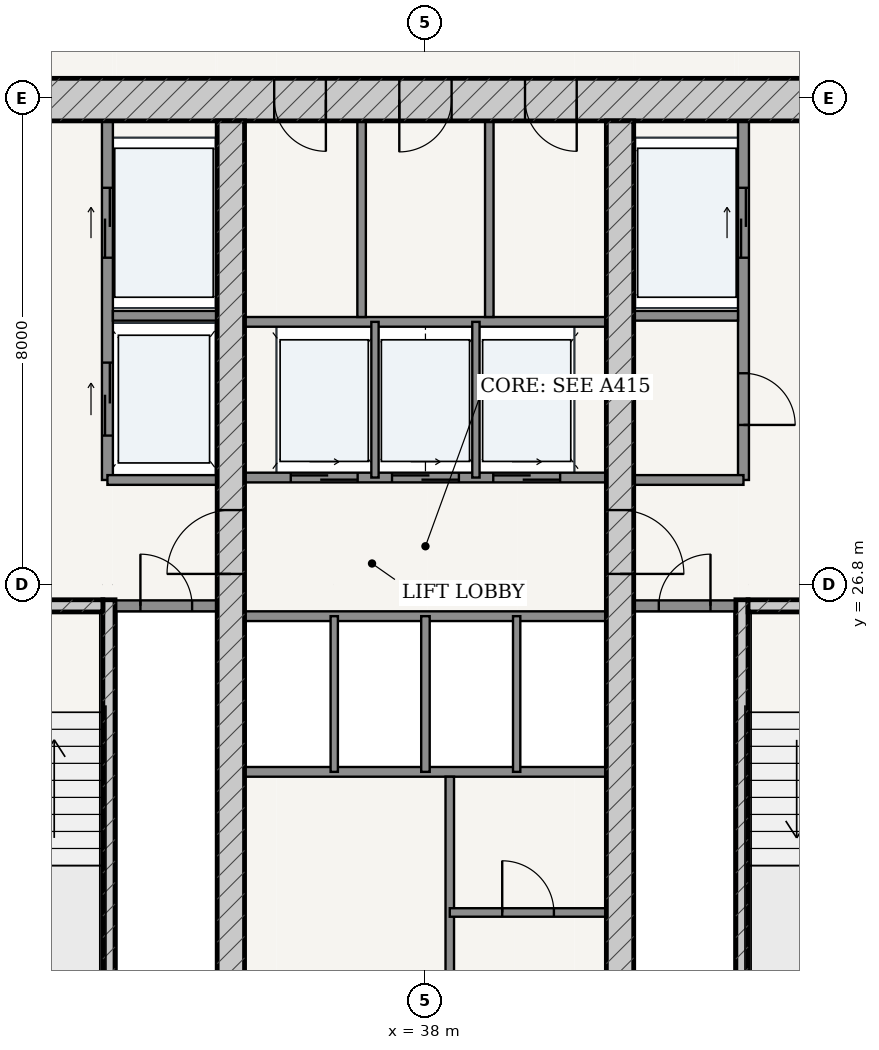
"""IFC4 building model, lengths in metres.
Left out: names, types, materials, properties, quantities, classifications, styles, units other than length and angle.
Written with IfcOpenShell. Run it as: python <this file> out.ifc"""

import sys

from ifc_helpers import new_model, si_unit, direction, frame, frame_2d, origin, place, context, subcontext, project, spatial, rectangle, extrude, source, transform, mapped, element, fill, save


model = new_model("IFC4")
c1 = context("Model", 3, precision=1e-05, world=origin(), true_north=direction((-0.2419218956, 0.970295726276)))
c2 = subcontext(c1, "Body", "Model", "MODEL_VIEW")
j1 = project(units=[si_unit("LENGTHUNIT", "METRE"), si_unit("PLANEANGLEUNIT", "RADIAN")], contexts=[c1])
p1 = place(None, origin())
s1 = spatial("IfcSite", under=j1, at=p1, CompositionType="ELEMENT")
p2 = place(p1, origin())
s2 = spatial("IfcBuilding", under=s1, at=p2, CompositionType="ELEMENT")
p3 = place(p2, frame((0.0, 0.0, 79.8)))
s3 = spatial("IfcBuildingStorey", under=s2, at=p3, CompositionType="ELEMENT", Elevation=79.8)
p4 = place(p3, frame((28.675, 34.775, 0.0), z_axis=(0.0, 0.0, 1.0), x_axis=(1.0, 0.0, 0.0)))
e1 = element("IfcWall", 1, at=p4, inside=s3, PredefinedType="SHEAR", context=c2, shape_type="SweptSolid", body=[
    extrude(rectangle(XDim=18.65, YDim=0.7, at=frame_2d((9.325, 0.0))), origin(), (0.0, 0.0, 1.0), 3.325),
])
p5 = place(p4, frame((6.837, 0.0, 0.0)))
e2 = element("IfcOpeningElement", 2, at=p5, cuts=e1, PredefinedType="OPENING", context=c2, shape_type="SweptSolid", body=[
    extrude(rectangle(XDim=0.85, YDim=2.1, at=frame_2d((0.425, 1.05))), frame((0.0, 0.36, 0.0), z_axis=(0.0, -1.0, 0.0), x_axis=(1.0, 0.0, 0.0)), (0.0, 0.0, 1.0), 0.72),
])
p6 = place(p4, frame((8.895, 0.0, 0.0)))
e3 = element("IfcOpeningElement", 3, at=p6, cuts=e1, PredefinedType="OPENING", context=c2, shape_type="SweptSolid", body=[
    extrude(rectangle(XDim=0.86, YDim=2.1, at=frame_2d((0.43, 1.05))), frame((0.0, 0.36, 0.0), z_axis=(0.0, -1.0, 0.0), x_axis=(1.0, 0.0, 0.0)), (0.0, 0.0, 1.0), 0.72),
])
p7 = place(p4, frame((10.962, 0.0, 0.0)))
e4 = element("IfcOpeningElement", 4, at=p7, cuts=e1, PredefinedType="OPENING", context=c2, shape_type="SweptSolid", body=[
    extrude(rectangle(XDim=0.85, YDim=2.1, at=frame_2d((0.425, 1.05))), frame((0.0, 0.36, 0.0), z_axis=(0.0, -1.0, 0.0), x_axis=(1.0, 0.0, 0.0)), (0.0, 0.0, 1.0), 0.72),
])
p8 = place(p3, frame((32.795, 19.175, 0.0), z_axis=(0.0, 0.0, 1.0), x_axis=(0.0, 1.0, 0.0)))
e5 = element("IfcWall", 5, at=p8, inside=s3, PredefinedType="SOLIDWALL", context=c2, shape_type="SweptSolid", body=[
    extrude(rectangle(XDim=7.375, YDim=0.2, at=frame_2d((3.688, 0.0))), origin(), (0.0, 0.0, 1.0), 3.325),
])
p9 = place(p3, frame((29.375, 26.45, 0.0), z_axis=(0.0, 0.0, 1.0), x_axis=(1.0, 0.0, 0.0)))
e6 = element("IfcWall", 6, at=p9, inside=s3, PredefinedType="SOLIDWALL", context=c2, shape_type="SweptSolid", body=[
    extrude(rectangle(XDim=3.32, YDim=0.2, at=frame_2d((1.66, 0.0))), origin(), (0.0, 0.0, 1.0), 3.325),
])
p10 = place(p9, frame((1.185, 0.0, 0.0)))
e7 = element("IfcOpeningElement", 7, at=p10, cuts=e6, PredefinedType="OPENING", context=c2, shape_type="SweptSolid", body=[
    extrude(rectangle(XDim=0.95, YDim=2.15, at=frame_2d((0.475, 1.075))), frame((0.0, 0.11, 0.0), z_axis=(0.0, -1.0, 0.0), x_axis=(1.0, 0.0, 0.0)), (0.0, 0.0, 1.0), 0.22),
])
p11 = place(p3, frame((43.205, 19.175, 0.0), z_axis=(0.0, 0.0, 1.0), x_axis=(0.0, 1.0, 0.0)))
e8 = element("IfcWall", 8, at=p11, inside=s3, PredefinedType="SOLIDWALL", context=c2, shape_type="SweptSolid", body=[
    extrude(rectangle(XDim=7.375, YDim=0.2, at=frame_2d((3.688, 0.0))), origin(), (0.0, 0.0, 1.0), 3.325),
])
p12 = place(p3, frame((43.305, 26.45, 0.0), z_axis=(0.0, 0.0, 1.0), x_axis=(1.0, 0.0, 0.0)))
e9 = element("IfcWall", 9, at=p12, inside=s3, PredefinedType="SOLIDWALL", context=c2, shape_type="SweptSolid", body=[
    extrude(rectangle(XDim=3.32, YDim=0.2, at=frame_2d((1.66, 0.0))), origin(), (0.0, 0.0, 1.0), 3.325),
])
p13 = place(p12, frame((1.185, 0.0, 0.0)))
e10 = element("IfcOpeningElement", 10, at=p13, cuts=e9, PredefinedType="OPENING", context=c2, shape_type="SweptSolid", body=[
    extrude(rectangle(XDim=0.95, YDim=2.15, at=frame_2d((0.475, 1.075))), frame((0.0, 0.11, 0.0), z_axis=(0.0, -1.0, 0.0), x_axis=(1.0, 0.0, 0.0)), (0.0, 0.0, 1.0), 0.22),
])
p14 = place(p3, frame((34.8, 19.175, 0.0), z_axis=(0.0, 0.0, 1.0), x_axis=(0.0, 1.0, 0.0)))
e11 = element("IfcWall", 11, at=p14, inside=s3, PredefinedType="SHEAR", context=c2, shape_type="SweptSolid", body=[
    extrude(rectangle(XDim=15.25, YDim=0.45, at=frame_2d((7.625, 0.0))), origin(), (0.0, 0.0, 1.0), 3.325),
])
p15 = place(p14, frame((7.8, 0.0, 0.0)))
e12 = element("IfcOpeningElement", 12, at=p15, cuts=e11, PredefinedType="OPENING", context=c2, shape_type="SweptSolid", body=[
    extrude(rectangle(XDim=1.05, YDim=2.15, at=frame_2d((0.525, 1.075))), frame((0.0, 0.235, 0.0), z_axis=(0.0, -1.0, 0.0), x_axis=(1.0, 0.0, 0.0)), (0.0, 0.0, 1.0), 0.47),
])
p16 = place(p3, frame((41.2, 19.175, 0.0), z_axis=(0.0, 0.0, 1.0), x_axis=(0.0, 1.0, 0.0)))
e13 = element("IfcWall", 13, at=p16, inside=s3, PredefinedType="SHEAR", context=c2, shape_type="SweptSolid", body=[
    extrude(rectangle(XDim=15.25, YDim=0.45, at=frame_2d((7.625, 0.0))), origin(), (0.0, 0.0, 1.0), 3.325),
])
p17 = place(p16, frame((7.8, 0.0, 0.0)))
e14 = element("IfcOpeningElement", 14, at=p17, cuts=e13, PredefinedType="OPENING", context=c2, shape_type="SweptSolid", body=[
    extrude(rectangle(XDim=1.05, YDim=2.15, at=frame_2d((0.525, 1.075))), frame((0.0, 0.235, 0.0), z_axis=(0.0, -1.0, 0.0), x_axis=(1.0, 0.0, 0.0)), (0.0, 0.0, 1.0), 0.47),
])
p18 = place(p3, frame((32.9, 26.45, 0.0), z_axis=(0.0, 0.0, 1.0), x_axis=(1.0, 0.0, 0.0)))
e15 = element("IfcWall", 15, at=p18, inside=s3, PredefinedType="PARTITIONING", context=c2, shape_type="SweptSolid", body=[
    extrude(rectangle(XDim=1.675, YDim=0.18, at=frame_2d((0.837, 0.0))), origin(), (0.0, 0.0, 1.0), 3.325),
])
p19 = place(p18, frame((0.413, 0.0, 0.0)))
e16 = element("IfcOpeningElement", 16, at=p19, cuts=e15, PredefinedType="OPENING", context=c2, shape_type="SweptSolid", body=[
    extrude(rectangle(XDim=0.85, YDim=2.1, at=frame_2d((0.425, 1.05))), frame((0.0, 0.1, 0.0), z_axis=(0.0, -1.0, 0.0), x_axis=(1.0, 0.0, 0.0)), (0.0, 0.0, 1.0), 0.2),
])
p20 = place(p3, frame((41.425, 26.45, 0.0), z_axis=(0.0, 0.0, 1.0), x_axis=(1.0, 0.0, 0.0)))
e17 = element("IfcWall", 17, at=p20, inside=s3, PredefinedType="PARTITIONING", context=c2, shape_type="SweptSolid", body=[
    extrude(rectangle(XDim=1.675, YDim=0.18, at=frame_2d((0.837, 0.0))), origin(), (0.0, 0.0, 1.0), 3.325),
])
p21 = place(p20, frame((0.413, 0.0, 0.0)))
e18 = element("IfcOpeningElement", 18, at=p21, cuts=e17, PredefinedType="OPENING", context=c2, shape_type="SweptSolid", body=[
    extrude(rectangle(XDim=0.85, YDim=2.1, at=frame_2d((0.425, 1.05))), frame((0.0, 0.1, 0.0), z_axis=(0.0, -1.0, 0.0), x_axis=(1.0, 0.0, 0.0)), (0.0, 0.0, 1.0), 0.2),
])
p22 = place(p3, frame((32.77, 28.52, 0.0), z_axis=(0.0, 0.0, 1.0), x_axis=(0.0, 1.0, 0.0)))
e19 = element("IfcWall", 19, at=p22, inside=s3, PredefinedType="PARTITIONING", context=c2, shape_type="SweptSolid", body=[
    extrude(rectangle(XDim=5.905, YDim=0.18, at=frame_2d((2.953, 0.0))), origin(), (0.0, 0.0, 1.0), 3.325),
])
p23 = place(p22, frame((3.655, 0.0, 0.0)))
e20 = element("IfcOpeningElement", 20, at=p23, cuts=e19, PredefinedType="OPENING", context=c2, shape_type="SweptSolid", body=[
    extrude(rectangle(XDim=1.15, YDim=2.2, at=frame_2d((0.575, 1.1))), frame((0.0, 0.1, 0.0), z_axis=(0.0, -1.0, 0.0), x_axis=(1.0, 0.0, 0.0)), (0.0, 0.0, 1.0), 0.2),
])
p24 = place(p22, frame((0.73, 0.0, 0.0)))
e21 = element("IfcOpeningElement", 21, at=p24, cuts=e19, PredefinedType="OPENING", context=c2, shape_type="SweptSolid", body=[
    extrude(rectangle(XDim=1.2, YDim=2.25, at=frame_2d((0.6, 1.125))), frame((0.0, 0.1, 0.0), z_axis=(0.0, -1.0, 0.0), x_axis=(1.0, 0.0, 0.0)), (0.0, 0.0, 1.0), 0.2),
])
p25 = place(p3, frame((32.86, 31.22, 0.0), z_axis=(0.0, 0.0, 1.0), x_axis=(1.0, 0.0, 0.0)))
e22 = element("IfcWall", 22, at=p25, inside=s3, PredefinedType="PARTITIONING", context=c2, shape_type="SweptSolid", body=[
    extrude(rectangle(XDim=1.715, YDim=0.16, at=frame_2d((0.857, 0.0))), origin(), (0.0, 0.0, 1.0), 3.325),
])
p26 = place(p3, frame((32.77, 28.52, 0.0), z_axis=(0.0, 0.0, 1.0), x_axis=(1.0, 0.0, 0.0)))
e23 = element("IfcWall", 23, at=p26, inside=s3, PredefinedType="PARTITIONING", context=c2, shape_type="SweptSolid", body=[
    extrude(rectangle(XDim=1.805, YDim=0.16, at=frame_2d((0.902, 0.0))), origin(), (0.0, 0.0, 1.0), 3.325),
])
p27 = place(p3, frame((43.23, 28.52, 0.0), z_axis=(0.0, 0.0, 1.0), x_axis=(0.0, 1.0, 0.0)))
e24 = element("IfcWall", 24, at=p27, inside=s3, PredefinedType="PARTITIONING", context=c2, shape_type="SweptSolid", body=[
    extrude(rectangle(XDim=5.905, YDim=0.18, at=frame_2d((2.953, 0.0))), origin(), (0.0, 0.0, 1.0), 3.325),
])
p28 = place(p27, frame((0.905, 0.0, 0.0)))
e25 = element("IfcOpeningElement", 25, at=p28, cuts=e24, PredefinedType="OPENING", context=c2, shape_type="SweptSolid", body=[
    extrude(rectangle(XDim=0.85, YDim=2.1, at=frame_2d((0.425, 1.05))), frame((0.0, 0.1, 0.0), z_axis=(0.0, -1.0, 0.0), x_axis=(1.0, 0.0, 0.0)), (0.0, 0.0, 1.0), 0.2),
])
p29 = place(p27, frame((3.655, 0.0, 0.0)))
e26 = element("IfcOpeningElement", 26, at=p29, cuts=e24, PredefinedType="OPENING", context=c2, shape_type="SweptSolid", body=[
    extrude(rectangle(XDim=1.15, YDim=2.2, at=frame_2d((0.575, 1.1))), frame((0.0, 0.1, 0.0), z_axis=(0.0, -1.0, 0.0), x_axis=(1.0, 0.0, 0.0)), (0.0, 0.0, 1.0), 0.2),
])
p30 = place(p3, frame((41.425, 31.22, 0.0), z_axis=(0.0, 0.0, 1.0), x_axis=(1.0, 0.0, 0.0)))
e27 = element("IfcWall", 27, at=p30, inside=s3, PredefinedType="PARTITIONING", context=c2, shape_type="SweptSolid", body=[
    extrude(rectangle(XDim=1.715, YDim=0.16, at=frame_2d((0.857, 0.0))), origin(), (0.0, 0.0, 1.0), 3.325),
])
p31 = place(p3, frame((41.425, 28.52, 0.0), z_axis=(0.0, 0.0, 1.0), x_axis=(1.0, 0.0, 0.0)))
e28 = element("IfcWall", 28, at=p31, inside=s3, PredefinedType="PARTITIONING", context=c2, shape_type="SweptSolid", body=[
    extrude(rectangle(XDim=1.805, YDim=0.16, at=frame_2d((0.902, 0.0))), origin(), (0.0, 0.0, 1.0), 3.325),
])
p32 = place(p3, frame((35.025, 28.56, 0.0), z_axis=(0.0, 0.0, 1.0), x_axis=(1.0, 0.0, 0.0)))
e29 = element("IfcWall", 29, at=p32, inside=s3, PredefinedType="PARTITIONING", context=c2, shape_type="SweptSolid", body=[
    extrude(rectangle(XDim=5.95, YDim=0.16, at=frame_2d((2.975, 0.0))), origin(), (0.0, 0.0, 1.0), 3.325),
])
p33 = place(p32, frame((0.76, 0.0, 0.0)))
e30 = element("IfcOpeningElement", 30, at=p33, cuts=e29, PredefinedType="OPENING", context=c2, shape_type="SweptSolid", body=[
    extrude(rectangle(XDim=1.1, YDim=2.2, at=frame_2d((0.55, 1.1))), frame((0.0, 0.09, 0.0), z_axis=(0.0, -1.0, 0.0), x_axis=(1.0, 0.0, 0.0)), (0.0, 0.0, 1.0), 0.18),
])
p34 = place(p32, frame((2.425, 0.0, 0.0)))
e31 = element("IfcOpeningElement", 31, at=p34, cuts=e29, PredefinedType="OPENING", context=c2, shape_type="SweptSolid", body=[
    extrude(rectangle(XDim=1.1, YDim=2.2, at=frame_2d((0.55, 1.1))), frame((0.0, 0.09, 0.0), z_axis=(0.0, -1.0, 0.0), x_axis=(1.0, 0.0, 0.0)), (0.0, 0.0, 1.0), 0.18),
])
p35 = place(p32, frame((4.09, 0.0, 0.0)))
e32 = element("IfcOpeningElement", 32, at=p35, cuts=e29, PredefinedType="OPENING", context=c2, shape_type="SweptSolid", body=[
    extrude(rectangle(XDim=1.1, YDim=2.2, at=frame_2d((0.55, 1.1))), frame((0.0, 0.09, 0.0), z_axis=(0.0, -1.0, 0.0), x_axis=(1.0, 0.0, 0.0)), (0.0, 0.0, 1.0), 0.18),
])
p36 = place(p3, frame((35.025, 31.12, 0.0), z_axis=(0.0, 0.0, 1.0), x_axis=(1.0, 0.0, 0.0)))
e33 = element("IfcWall", 33, at=p36, inside=s3, PredefinedType="PARTITIONING", context=c2, shape_type="SweptSolid", body=[
    extrude(rectangle(XDim=5.95, YDim=0.16, at=frame_2d((2.975, 0.0))), origin(), (0.0, 0.0, 1.0), 3.325),
])
for number, where, z_axis, x_axis in (
    (34, (37.17, 28.56, 0.0), (0.0, 0.0, 1.0), (0.0, 1.0, 0.0)),
    (35, (38.83, 28.56, 0.0), (0.0, 0.0, 1.0), (0.0, 1.0, 0.0)),
):
    element("IfcWall", number, at=place(p3, frame(where, z_axis=z_axis, x_axis=x_axis)), inside=s3, PredefinedType="PARTITIONING", context=c2, shape_type="SweptSolid", body=[
        extrude(rectangle(XDim=2.56, YDim=0.12, at=frame_2d((1.28, 0.0))), origin(), (0.0, 0.0, 1.0), 3.325),
    ])
for number, where, z_axis, x_axis in (
    (36, (36.95, 31.2, 0.0), (0.0, 0.0, 1.0), (0.0, 1.0, 0.0)),
    (37, (39.05, 31.2, 0.0), (0.0, 0.0, 1.0), (0.0, 1.0, 0.0)),
):
    element("IfcWall", number, at=place(p3, frame(where, z_axis=z_axis, x_axis=x_axis)), inside=s3, PredefinedType="PARTITIONING", context=c2, shape_type="SweptSolid", body=[
        extrude(rectangle(XDim=3.225, YDim=0.14, at=frame_2d((1.613, 0.0))), origin(), (0.0, 0.0, 1.0), 3.325),
    ])
for number, where, z_axis, x_axis in (
    (38, (35.025, 26.28, 0.0), (0.0, 0.0, 1.0), (1.0, 0.0, 0.0)),
    (39, (35.025, 23.72, 0.0), (0.0, 0.0, 1.0), (1.0, 0.0, 0.0)),
):
    element("IfcWall", number, at=place(p3, frame(where, z_axis=z_axis, x_axis=x_axis)), inside=s3, PredefinedType="PARTITIONING", context=c2, shape_type="SweptSolid", body=[
        extrude(rectangle(XDim=5.95, YDim=0.16, at=frame_2d((2.975, 0.0))), origin(), (0.0, 0.0, 1.0), 3.325),
    ])
p37 = place(p3, frame((36.5, 23.72, 0.0), z_axis=(0.0, 0.0, 1.0), x_axis=(0.0, 1.0, 0.0)))
e40 = element("IfcWall", 40, at=p37, inside=s3, PredefinedType="PARTITIONING", context=c2, shape_type="SweptSolid", body=[
    extrude(rectangle(XDim=2.56, YDim=0.12, at=frame_2d((1.28, 0.0))), origin(), (0.0, 0.0, 1.0), 3.325),
])
p38 = place(p3, frame((38.0, 23.72, 0.0), z_axis=(0.0, 0.0, 1.0), x_axis=(0.0, 1.0, 0.0)))
e41 = element("IfcWall", 41, at=p38, inside=s3, PredefinedType="PARTITIONING", context=c2, shape_type="SweptSolid", body=[
    extrude(rectangle(XDim=2.56, YDim=0.14, at=frame_2d((1.28, 0.0))), origin(), (0.0, 0.0, 1.0), 3.325),
])
p39 = place(p3, frame((39.5, 23.72, 0.0), z_axis=(0.0, 0.0, 1.0), x_axis=(0.0, 1.0, 0.0)))
e42 = element("IfcWall", 42, at=p39, inside=s3, PredefinedType="PARTITIONING", context=c2, shape_type="SweptSolid", body=[
    extrude(rectangle(XDim=2.56, YDim=0.12, at=frame_2d((1.28, 0.0))), origin(), (0.0, 0.0, 1.0), 3.325),
])
p40 = place(p3, frame((38.4, 19.175, 0.0), z_axis=(0.0, 0.0, 1.0), x_axis=(0.0, 1.0, 0.0)))
e43 = element("IfcWall", 43, at=p40, inside=s3, PredefinedType="PARTITIONING", context=c2, shape_type="SweptSolid", body=[
    extrude(rectangle(XDim=4.465, YDim=0.14, at=frame_2d((2.232, 0.0))), origin(), (0.0, 0.0, 1.0), 3.325),
])
p41 = place(p3, frame((38.4, 21.407, 0.0), z_axis=(0.0, 0.0, 1.0), x_axis=(1.0, 0.0, 0.0)))
e44 = element("IfcWall", 44, at=p41, inside=s3, PredefinedType="PARTITIONING", context=c2, shape_type="SweptSolid", body=[
    extrude(rectangle(XDim=2.575, YDim=0.14, at=frame_2d((1.288, 0.0))), origin(), (0.0, 0.0, 1.0), 3.325),
])
p42 = place(p41, frame((0.863, 0.0, 0.0)))
e45 = element("IfcOpeningElement", 45, at=p42, cuts=e44, PredefinedType="OPENING", context=c2, shape_type="SweptSolid", body=[
    extrude(rectangle(XDim=0.85, YDim=2.1, at=frame_2d((0.425, 1.05))), frame((0.0, 0.08, 0.0), z_axis=(0.0, -1.0, 0.0), x_axis=(1.0, 0.0, 0.0)), (0.0, 0.0, 1.0), 0.16),
])
m1 = source(origin(), c2, "Body", "SweptSolid", [
    extrude(rectangle(XDim=1.05, YDim=2.15, at=frame_2d((0.525, 1.075))), frame((0.0, 0.025, 0.0), z_axis=(0.0, -1.0, 0.0), x_axis=(1.0, 0.0, 0.0)), (0.0, 0.0, 1.0), 0.05),
])
p43 = place(p15, origin())
e46 = element("IfcDoor", 46, at=p43, inside=s3, OperationType="SINGLE_SWING_LEFT", PredefinedType="DOOR", context=c2, shape_type="MappedRepresentation", body=[
    mapped(m1, transform((0.0, 0.0, 0.0), scale=1.0)),
])
fill(e12, e46)
p44 = place(p17, frame((1.05, 0.0, 0.0), z_axis=(0.0, 0.0, 1.0), x_axis=(-1.0, 0.0, 0.0)))
e47 = element("IfcDoor", 47, at=p44, inside=s3, OperationType="SINGLE_SWING_RIGHT", PredefinedType="DOOR", context=c2, shape_type="MappedRepresentation", body=[
    mapped(m1, transform((0.0, 0.0, 0.0), scale=1.0)),
])
fill(e14, e47)
m2 = source(origin(), c2, "Body", "SweptSolid", [
    extrude(rectangle(XDim=0.85, YDim=2.1, at=frame_2d((0.425, 1.05))), frame((0.0, 0.025, 0.0), z_axis=(0.0, -1.0, 0.0), x_axis=(1.0, 0.0, 0.0)), (0.0, 0.0, 1.0), 0.05),
])
p45 = place(p19, origin())
e48 = element("IfcDoor", 48, at=p45, inside=s3, OperationType="SINGLE_SWING_LEFT", PredefinedType="DOOR", context=c2, shape_type="MappedRepresentation", body=[
    mapped(m2, transform((0.0, 0.0, 0.0), scale=1.0)),
])
fill(e16, e48)
p46 = place(p21, origin())
e49 = element("IfcDoor", 49, at=p46, inside=s3, OperationType="SINGLE_SWING_RIGHT", PredefinedType="DOOR", context=c2, shape_type="MappedRepresentation", body=[
    mapped(m2, transform((0.0, 0.0, 0.0), scale=1.0)),
])
fill(e18, e49)
p47 = place(p28, frame((0.85, 0.0, 0.0), z_axis=(0.0, 0.0, 1.0), x_axis=(-1.0, 0.0, 0.0)))
e50 = element("IfcDoor", 50, at=p47, inside=s3, OperationType="SINGLE_SWING_RIGHT", PredefinedType="DOOR", context=c2, shape_type="MappedRepresentation", body=[
    mapped(m2, transform((0.0, 0.0, 0.0), scale=1.0)),
])
fill(e25, e50)
p48 = place(p5, frame((0.85, 0.0, 0.0), z_axis=(0.0, 0.0, 1.0), x_axis=(-1.0, 0.0, 0.0)))
e51 = element("IfcDoor", 51, at=p48, inside=s3, OperationType="SINGLE_SWING_LEFT", PredefinedType="DOOR", context=c2, shape_type="MappedRepresentation", body=[
    mapped(m2, transform((0.0, 0.0, 0.0), scale=1.0)),
])
fill(e2, e51)
m3 = source(origin(), c2, "Body", "SweptSolid", [
    extrude(rectangle(XDim=0.86, YDim=2.1, at=frame_2d((0.43, 1.05))), frame((0.0, 0.025, 0.0), z_axis=(0.0, -1.0, 0.0), x_axis=(1.0, 0.0, 0.0)), (0.0, 0.0, 1.0), 0.05),
])
p49 = place(p6, frame((0.86, 0.0, 0.0), z_axis=(0.0, 0.0, 1.0), x_axis=(-1.0, 0.0, 0.0)))
e52 = element("IfcDoor", 52, at=p49, inside=s3, OperationType="SINGLE_SWING_RIGHT", PredefinedType="DOOR", context=c2, shape_type="MappedRepresentation", body=[
    mapped(m3, transform((0.0, 0.0, 0.0), scale=1.0)),
])
fill(e3, e52)
p50 = place(p7, frame((0.85, 0.0, 0.0), z_axis=(0.0, 0.0, 1.0), x_axis=(-1.0, 0.0, 0.0)))
e53 = element("IfcDoor", 53, at=p50, inside=s3, OperationType="SINGLE_SWING_LEFT", PredefinedType="DOOR", context=c2, shape_type="MappedRepresentation", body=[
    mapped(m2, transform((0.0, 0.0, 0.0), scale=1.0)),
])
fill(e4, e53)
p51 = place(p42, origin())
e54 = element("IfcDoor", 54, at=p51, inside=s3, OperationType="SINGLE_SWING_LEFT", PredefinedType="DOOR", context=c2, shape_type="MappedRepresentation", body=[
    mapped(m2, transform((0.0, 0.0, 0.0), scale=1.0)),
])
fill(e45, e54)
m4 = source(origin(), c2, "Body", "SweptSolid", [
    extrude(rectangle(XDim=1.15, YDim=2.2, at=frame_2d((0.575, 1.1))), frame((0.0, 0.025, 0.0), z_axis=(0.0, -1.0, 0.0), x_axis=(1.0, 0.0, 0.0)), (0.0, 0.0, 1.0), 0.05),
])
p52 = place(p23, origin())
e55 = element("IfcDoor", 55, at=p52, inside=s3, OperationType="DOUBLE_DOOR_SLIDING", PredefinedType="DOOR", context=c2, shape_type="MappedRepresentation", body=[
    mapped(m4, transform((0.0, 0.0, 0.0), scale=1.0)),
])
fill(e20, e55)
p53 = place(p29, origin())
e56 = element("IfcDoor", 56, at=p53, inside=s3, OperationType="DOUBLE_DOOR_SLIDING", PredefinedType="DOOR", context=c2, shape_type="MappedRepresentation", body=[
    mapped(m4, transform((0.0, 0.0, 0.0), scale=1.0)),
])
fill(e26, e56)
m5 = source(origin(), c2, "Body", "SweptSolid", [
    extrude(rectangle(XDim=1.2, YDim=2.25, at=frame_2d((0.6, 1.125))), frame((0.0, 0.025, 0.0), z_axis=(0.0, -1.0, 0.0), x_axis=(1.0, 0.0, 0.0)), (0.0, 0.0, 1.0), 0.05),
])
p54 = place(p24, origin())
e57 = element("IfcDoor", 57, at=p54, inside=s3, OperationType="DOUBLE_DOOR_SLIDING", PredefinedType="DOOR", context=c2, shape_type="MappedRepresentation", body=[
    mapped(m5, transform((0.0, 0.0, 0.0), scale=1.0)),
])
fill(e21, e57)
m6 = source(origin(), c2, "Body", "SweptSolid", [
    extrude(rectangle(XDim=1.1, YDim=2.2, at=frame_2d((0.55, 1.1))), frame((0.0, 0.025, 0.0), z_axis=(0.0, -1.0, 0.0), x_axis=(1.0, 0.0, 0.0)), (0.0, 0.0, 1.0), 0.05),
])
p55 = place(p33, origin())
e58 = element("IfcDoor", 58, at=p55, inside=s3, OperationType="DOUBLE_DOOR_SLIDING", PredefinedType="DOOR", context=c2, shape_type="MappedRepresentation", body=[
    mapped(m6, transform((0.0, 0.0, 0.0), scale=1.0)),
])
fill(e30, e58)
p56 = place(p34, origin())
e59 = element("IfcDoor", 59, at=p56, inside=s3, OperationType="DOUBLE_DOOR_SLIDING", PredefinedType="DOOR", context=c2, shape_type="MappedRepresentation", body=[
    mapped(m6, transform((0.0, 0.0, 0.0), scale=1.0)),
])
fill(e31, e59)
p57 = place(p35, origin())
e60 = element("IfcDoor", 60, at=p57, inside=s3, OperationType="DOUBLE_DOOR_SLIDING", PredefinedType="DOOR", context=c2, shape_type="MappedRepresentation", body=[
    mapped(m6, transform((0.0, 0.0, 0.0), scale=1.0)),
])
fill(e32, e60)
save(model, sys.argv[1])
